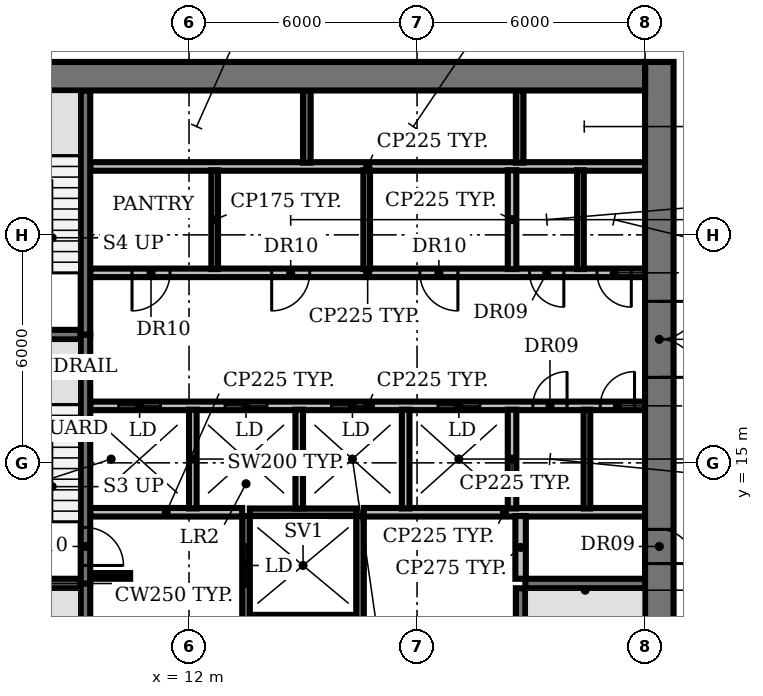
"""IFC4 building model, lengths in metres.
Left out: names, types, materials, properties, quantities, classifications, styles, units other than length and angle.
Written with IfcOpenShell. Run it as: python <this file> out.ifc"""

import sys

from ifc_helpers import new_model, si_unit, direction, frame, frame_2d, origin, place, context, subcontext, project, spatial, rectangle, extrude, element, fill, save


model = new_model("IFC4")
c1 = context("Model", 3, precision=1e-05, world=origin(), true_north=direction((0.0, 1.0)))
c2 = subcontext(c1, "Body", "Model", "MODEL_VIEW")
j1 = project(units=[si_unit("LENGTHUNIT", "METRE"), si_unit("PLANEANGLEUNIT", "RADIAN")], contexts=[c1])
p1 = place(None, origin())
s1 = spatial("IfcSite", under=j1, at=p1, CompositionType="ELEMENT")
p2 = place(p1, origin())
s2 = spatial("IfcBuilding", under=s1, at=p2, CompositionType="ELEMENT")
p3 = place(p2, frame((0.0, 0.0, 96.2)))
s3 = spatial("IfcBuildingStorey", under=s2, at=p3, CompositionType="ELEMENT", Elevation=96.2)
p4 = place(p3, frame((13.6, 10.9, 0.0), z_axis=(0.0, 0.0, 1.0), x_axis=(1.0, 0.0, 0.0)))
e1 = element("IfcWall", 1, at=p4, inside=s3, PredefinedType="SHEAR", context=c2, shape_type="SweptSolid", body=[
    extrude(rectangle(XDim=2.8, YDim=0.2, at=frame_2d((1.4, 0.0))), origin(), (0.0, 0.0, 1.0), 3.85),
])
for number, where, z_axis, x_axis in (
    (2, (6.0, 11.825, 0.0), (0.0, 0.0, 1.0), (1.0, 0.0, 0.0)),
    (3, (20.85, 11.825, 0.0), (0.0, 0.0, 1.0), (1.0, 0.0, 0.0)),
):
    element("IfcWall", number, at=place(p3, frame(where, z_axis=z_axis, x_axis=x_axis)), inside=s3, PredefinedType="SHEAR", context=c2, shape_type="SweptSolid", body=[
        extrude(rectangle(XDim=3.15, YDim=0.25, at=frame_2d((1.575, 0.0))), origin(), (0.0, 0.0, 1.0), 3.85),
    ])
p5 = place(p3, frame((9.4, 12.025, 0.0), z_axis=(0.0, 0.0, 1.0), x_axis=(1.0, 0.0, 0.0)))
e4 = element("IfcWall", 4, at=p5, inside=s3, PredefinedType="SHEAR", context=c2, shape_type="SweptSolid", body=[
    extrude(rectangle(XDim=1.05, YDim=0.15, at=frame_2d((0.525, 0.0))), origin(), (0.0, 0.0, 1.0), 3.85),
])
p6 = place(p3, frame((9.4, 13.7, 0.0), z_axis=(0.0, 0.0, 1.0), x_axis=(1.0, 0.0, 0.0)))
e5 = element("IfcWall", 5, at=p6, inside=s3, PredefinedType="PARTITIONING", context=c2, shape_type="SweptSolid", body=[
    extrude(rectangle(XDim=4.0, YDim=0.225, at=frame_2d((2.0, 0.0))), origin(), (0.0, 0.0, 1.0), 3.85),
])
p7 = place(p3, frame((13.6, 13.7, 0.0), z_axis=(0.0, 0.0, 1.0), x_axis=(1.0, 0.0, 0.0)))
e6 = element("IfcWall", 6, at=p7, inside=s3, PredefinedType="SHEAR", context=c2, shape_type="SweptSolid", body=[
    extrude(rectangle(XDim=2.8, YDim=0.2, at=frame_2d((1.4, 0.0))), origin(), (0.0, 0.0, 1.0), 3.85),
])
p8 = place(p3, frame((16.6, 13.7, 0.0), z_axis=(0.0, 0.0, 1.0), x_axis=(1.0, 0.0, 0.0)))
e7 = element("IfcWall", 7, at=p8, inside=s3, PredefinedType="PARTITIONING", context=c2, shape_type="SweptSolid", body=[
    extrude(rectangle(XDim=7.4, YDim=0.225, at=frame_2d((3.7, 0.0))), origin(), (0.0, 0.0, 1.0), 3.85),
])
p9 = place(p3, frame((9.4, 16.5, 0.0), z_axis=(0.0, 0.0, 1.0), x_axis=(1.0, 0.0, 0.0)))
e8 = element("IfcWall", 8, at=p9, inside=s3, PredefinedType="PARTITIONING", context=c2, shape_type="SweptSolid", body=[
    extrude(rectangle(XDim=14.6, YDim=0.225, at=frame_2d((7.3, 0.0))), origin(), (0.0, 0.0, 1.0), 3.85),
])
p10 = place(p9, frame((0.75, 0.0, 0.0)))
e9 = element("IfcOpeningElement", 9, at=p10, cuts=e8, PredefinedType="OPENING", context=c2, shape_type="SweptSolid", body=[
    extrude(rectangle(XDim=1.1, YDim=2.1, at=frame_2d((0.55, 1.05))), frame((0.0, 0.123, 0.0), z_axis=(0.0, -1.0, 0.0), x_axis=(1.0, 0.0, 0.0)), (0.0, 0.0, 1.0), 0.245),
])
p11 = place(p9, frame((3.55, 0.0, 0.0)))
e10 = element("IfcOpeningElement", 10, at=p11, cuts=e8, PredefinedType="OPENING", context=c2, shape_type="SweptSolid", body=[
    extrude(rectangle(XDim=1.1, YDim=2.1, at=frame_2d((0.55, 1.05))), frame((0.0, 0.123, 0.0), z_axis=(0.0, -1.0, 0.0), x_axis=(1.0, 0.0, 0.0)), (0.0, 0.0, 1.0), 0.245),
])
p12 = place(p9, frame((6.35, 0.0, 0.0)))
e11 = element("IfcOpeningElement", 11, at=p12, cuts=e8, PredefinedType="OPENING", context=c2, shape_type="SweptSolid", body=[
    extrude(rectangle(XDim=1.1, YDim=2.1, at=frame_2d((0.55, 1.05))), frame((0.0, 0.123, 0.0), z_axis=(0.0, -1.0, 0.0), x_axis=(1.0, 0.0, 0.0)), (0.0, 0.0, 1.0), 0.245),
])
p13 = place(p9, frame((9.15, 0.0, 0.0)))
e12 = element("IfcOpeningElement", 12, at=p13, cuts=e8, PredefinedType="OPENING", context=c2, shape_type="SweptSolid", body=[
    extrude(rectangle(XDim=1.1, YDim=2.1, at=frame_2d((0.55, 1.05))), frame((0.0, 0.123, 0.0), z_axis=(0.0, -1.0, 0.0), x_axis=(1.0, 0.0, 0.0)), (0.0, 0.0, 1.0), 0.245),
])
p14 = place(p9, frame((11.647, 0.0, 0.0)))
e13 = element("IfcOpeningElement", 13, at=p14, cuts=e8, PredefinedType="OPENING", context=c2, shape_type="SweptSolid", body=[
    extrude(rectangle(XDim=0.9, YDim=2.1, at=frame_2d((0.45, 1.05))), frame((0.0, 0.123, 0.0), z_axis=(0.0, -1.0, 0.0), x_axis=(1.0, 0.0, 0.0)), (0.0, 0.0, 1.0), 0.245),
])
p15 = place(p9, frame((13.423, 0.0, 0.0)))
e14 = element("IfcOpeningElement", 14, at=p15, cuts=e8, PredefinedType="OPENING", context=c2, shape_type="SweptSolid", body=[
    extrude(rectangle(XDim=0.9, YDim=2.1, at=frame_2d((0.45, 1.05))), frame((0.0, 0.123, 0.0), z_axis=(0.0, -1.0, 0.0), x_axis=(1.0, 0.0, 0.0)), (0.0, 0.0, 1.0), 0.245),
])
p16 = place(p3, frame((6.0, 18.375, 0.0), z_axis=(0.0, 0.0, 1.0), x_axis=(1.0, 0.0, 0.0)))
e15 = element("IfcWall", 15, at=p16, inside=s3, PredefinedType="SHEAR", context=c2, shape_type="SweptSolid", body=[
    extrude(rectangle(XDim=3.15, YDim=0.25, at=frame_2d((1.575, 0.0))), origin(), (0.0, 0.0, 1.0), 3.85),
])
p17 = place(p3, frame((24.0, 20.0, 0.0), z_axis=(0.0, 0.0, 1.0), x_axis=(-1.0, 0.0, 0.0)))
e16 = element("IfcWall", 16, at=p17, inside=s3, PredefinedType="PARTITIONING", context=c2, shape_type="SweptSolid", body=[
    extrude(rectangle(XDim=14.6, YDim=0.225, at=frame_2d((7.3, 0.0))), origin(), (0.0, 0.0, 1.0), 3.85),
])
p18 = place(p17, frame((12.5, 0.0, 0.0)))
e17 = element("IfcOpeningElement", 17, at=p18, cuts=e16, PredefinedType="OPENING", context=c2, shape_type="SweptSolid", body=[
    extrude(rectangle(XDim=1.0, YDim=2.1, at=frame_2d((0.5, 1.05))), frame((0.0, 0.123, 0.0), z_axis=(0.0, -1.0, 0.0), x_axis=(1.0, 0.0, 0.0)), (0.0, 0.0, 1.0), 0.245),
])
p19 = place(p17, frame((8.825, 0.0, 0.0)))
e18 = element("IfcOpeningElement", 18, at=p19, cuts=e16, PredefinedType="OPENING", context=c2, shape_type="SweptSolid", body=[
    extrude(rectangle(XDim=1.0, YDim=2.1, at=frame_2d((0.5, 1.05))), frame((0.0, 0.123, 0.0), z_axis=(0.0, -1.0, 0.0), x_axis=(1.0, 0.0, 0.0)), (0.0, 0.0, 1.0), 0.245),
])
p20 = place(p17, frame((4.925, 0.0, 0.0)))
e19 = element("IfcOpeningElement", 19, at=p20, cuts=e16, PredefinedType="OPENING", context=c2, shape_type="SweptSolid", body=[
    extrude(rectangle(XDim=1.0, YDim=2.1, at=frame_2d((0.5, 1.05))), frame((0.0, 0.123, 0.0), z_axis=(0.0, -1.0, 0.0), x_axis=(1.0, 0.0, 0.0)), (0.0, 0.0, 1.0), 0.245),
])
p21 = place(p17, frame((2.137, 0.0, 0.0)))
e20 = element("IfcOpeningElement", 20, at=p21, cuts=e16, PredefinedType="OPENING", context=c2, shape_type="SweptSolid", body=[
    extrude(rectangle(XDim=0.9, YDim=2.1, at=frame_2d((0.45, 1.05))), frame((0.0, 0.123, 0.0), z_axis=(0.0, -1.0, 0.0), x_axis=(1.0, 0.0, 0.0)), (0.0, 0.0, 1.0), 0.245),
])
p22 = place(p17, frame((0.363, 0.0, 0.0)))
e21 = element("IfcOpeningElement", 21, at=p22, cuts=e16, PredefinedType="OPENING", context=c2, shape_type="SweptSolid", body=[
    extrude(rectangle(XDim=0.9, YDim=2.1, at=frame_2d((0.45, 1.05))), frame((0.0, 0.123, 0.0), z_axis=(0.0, -1.0, 0.0), x_axis=(1.0, 0.0, 0.0)), (0.0, 0.0, 1.0), 0.245),
])
p23 = place(p3, frame((9.4, 22.8, 0.0), z_axis=(0.0, 0.0, 1.0), x_axis=(1.0, 0.0, 0.0)))
e22 = element("IfcWall", 22, at=p23, inside=s3, PredefinedType="PARTITIONING", context=c2, shape_type="SweptSolid", body=[
    extrude(rectangle(XDim=14.6, YDim=0.225, at=frame_2d((7.3, 0.0))), origin(), (0.0, 0.0, 1.0), 3.85),
])
p24 = place(p3, frame((9.275, 11.825, 0.0), z_axis=(0.0, 0.0, 1.0), x_axis=(0.0, -1.0, 0.0)))
e23 = element("IfcWall", 23, at=p24, inside=s3, PredefinedType="SHEAR", context=c2, shape_type="SweptSolid", body=[
    extrude(rectangle(XDim=6.425, YDim=0.25, at=frame_2d((3.212, 0.0))), origin(), (0.0, 0.0, 1.0), 3.85),
])
p25 = place(p24, frame((5.075, 0.0, 0.0)))
e24 = element("IfcOpeningElement", 24, at=p25, cuts=e23, PredefinedType="OPENING", context=c2, shape_type="SweptSolid", body=[
    extrude(rectangle(XDim=1.0, YDim=2.1, at=frame_2d((0.5, 1.05))), frame((0.0, 0.135, 0.0), z_axis=(0.0, -1.0, 0.0), x_axis=(1.0, 0.0, 0.0)), (0.0, 0.0, 1.0), 0.27),
])
p26 = place(p3, frame((9.275, 18.375, 0.0), z_axis=(0.0, 0.0, 1.0), x_axis=(0.0, -1.0, 0.0)))
e25 = element("IfcWall", 25, at=p26, inside=s3, PredefinedType="SHEAR", context=c2, shape_type="SweptSolid", body=[
    extrude(rectangle(XDim=6.55, YDim=0.25, at=frame_2d((3.275, 0.0))), origin(), (0.0, 0.0, 1.0), 3.85),
])
p27 = place(p26, frame((5.075, 0.0, 0.0)))
e26 = element("IfcOpeningElement", 26, at=p27, cuts=e25, PredefinedType="OPENING", context=c2, shape_type="SweptSolid", body=[
    extrude(rectangle(XDim=1.0, YDim=2.1, at=frame_2d((0.5, 1.05))), frame((0.0, 0.135, 0.0), z_axis=(0.0, -1.0, 0.0), x_axis=(1.0, 0.0, 0.0)), (0.0, 0.0, 1.0), 0.27),
])
p28 = place(p3, frame((9.275, 18.375, 0.0), z_axis=(0.0, 0.0, 1.0), x_axis=(0.0, 1.0, 0.0)))
e27 = element("IfcWall", 27, at=p28, inside=s3, PredefinedType="SHEAR", context=c2, shape_type="SweptSolid", body=[
    extrude(rectangle(XDim=6.425, YDim=0.25, at=frame_2d((3.212, 0.0))), origin(), (0.0, 0.0, 1.0), 3.85),
])
p29 = place(p3, frame((12.1, 13.8, 0.0), z_axis=(0.0, 0.0, 1.0), x_axis=(0.0, 1.0, 0.0)))
e28 = element("IfcWall", 28, at=p29, inside=s3, PredefinedType="SOLIDWALL", context=c2, shape_type="SweptSolid", body=[
    extrude(rectangle(XDim=2.6, YDim=0.2, at=frame_2d((1.3, 0.0))), origin(), (0.0, 0.0, 1.0), 3.85),
])
p30 = place(p3, frame((12.675, 20.1, 0.0), z_axis=(0.0, 0.0, 1.0), x_axis=(0.0, 1.0, 0.0)))
e29 = element("IfcWall", 29, at=p30, inside=s3, PredefinedType="PARTITIONING", context=c2, shape_type="SweptSolid", body=[
    extrude(rectangle(XDim=2.6, YDim=0.175, at=frame_2d((1.3, 0.0))), origin(), (0.0, 0.0, 1.0), 3.85),
])
p31 = place(p3, frame((13.5, 5.4, 0.0), z_axis=(0.0, 0.0, 1.0), x_axis=(0.0, 1.0, 0.0)))
e30 = element("IfcWall", 30, at=p31, inside=s3, PredefinedType="SHEAR", context=c2, shape_type="SweptSolid", body=[
    extrude(rectangle(XDim=8.2, YDim=0.2, at=frame_2d((4.1, 0.0))), origin(), (0.0, 0.0, 1.0), 3.85),
])
p32 = place(p31, frame((0.75, 0.0, 0.0)))
e31 = element("IfcOpeningElement", 31, at=p32, cuts=e30, PredefinedType="OPENING", context=c2, shape_type="SweptSolid", body=[
    extrude(rectangle(XDim=1.1, YDim=2.1, at=frame_2d((0.55, 1.05))), frame((0.0, 0.11, 0.0), z_axis=(0.0, -1.0, 0.0), x_axis=(1.0, 0.0, 0.0)), (0.0, 0.0, 1.0), 0.22),
])
p33 = place(p31, frame((3.55, 0.0, 0.0)))
e32 = element("IfcOpeningElement", 32, at=p33, cuts=e30, PredefinedType="OPENING", context=c2, shape_type="SweptSolid", body=[
    extrude(rectangle(XDim=1.1, YDim=2.1, at=frame_2d((0.55, 1.05))), frame((0.0, 0.11, 0.0), z_axis=(0.0, -1.0, 0.0), x_axis=(1.0, 0.0, 0.0)), (0.0, 0.0, 1.0), 0.22),
])
p34 = place(p31, frame((6.35, 0.0, 0.0)))
e33 = element("IfcOpeningElement", 33, at=p34, cuts=e30, PredefinedType="OPENING", context=c2, shape_type="SweptSolid", body=[
    extrude(rectangle(XDim=1.1, YDim=2.1, at=frame_2d((0.55, 1.05))), frame((0.0, 0.11, 0.0), z_axis=(0.0, -1.0, 0.0), x_axis=(1.0, 0.0, 0.0)), (0.0, 0.0, 1.0), 0.22),
])
p35 = place(p3, frame((14.9, 13.8, 0.0), z_axis=(0.0, 0.0, 1.0), x_axis=(0.0, 1.0, 0.0)))
e34 = element("IfcWall", 34, at=p35, inside=s3, PredefinedType="SOLIDWALL", context=c2, shape_type="SweptSolid", body=[
    extrude(rectangle(XDim=2.6, YDim=0.2, at=frame_2d((1.3, 0.0))), origin(), (0.0, 0.0, 1.0), 3.85),
])
p36 = place(p3, frame((15.1, 22.9, 0.0), z_axis=(0.0, 0.0, 1.0), x_axis=(0.0, 1.0, 0.0)))
e35 = element("IfcWall", 35, at=p36, inside=s3, PredefinedType="SHEAR", context=c2, shape_type="SweptSolid", body=[
    extrude(rectangle(XDim=1.9, YDim=0.2, at=frame_2d((0.95, 0.0))), origin(), (0.0, 0.0, 1.0), 3.85),
])
p37 = place(p3, frame((16.5, 5.4, 0.0), z_axis=(0.0, 0.0, 1.0), x_axis=(0.0, 1.0, 0.0)))
e36 = element("IfcWall", 36, at=p37, inside=s3, PredefinedType="SHEAR", context=c2, shape_type="SweptSolid", body=[
    extrude(rectangle(XDim=8.2, YDim=0.2, at=frame_2d((4.1, 0.0))), origin(), (0.0, 0.0, 1.0), 3.85),
])
p38 = place(p3, frame((16.675, 20.1, 0.0), z_axis=(0.0, 0.0, 1.0), x_axis=(0.0, 1.0, 0.0)))
e37 = element("IfcWall", 37, at=p38, inside=s3, PredefinedType="PARTITIONING", context=c2, shape_type="SweptSolid", body=[
    extrude(rectangle(XDim=2.6, YDim=0.175, at=frame_2d((1.3, 0.0))), origin(), (0.0, 0.0, 1.0), 3.85),
])
p39 = place(p3, frame((17.7, 13.8, 0.0), z_axis=(0.0, 0.0, 1.0), x_axis=(0.0, 1.0, 0.0)))
e38 = element("IfcWall", 38, at=p39, inside=s3, PredefinedType="SOLIDWALL", context=c2, shape_type="SweptSolid", body=[
    extrude(rectangle(XDim=2.6, YDim=0.2, at=frame_2d((1.3, 0.0))), origin(), (0.0, 0.0, 1.0), 3.85),
])
for number, where, z_axis, x_axis in (
    (39, (20.5, 13.8, 0.0), (0.0, 0.0, 1.0), (0.0, 1.0, 0.0)),
    (40, (20.5, 20.1, 0.0), (0.0, 0.0, 1.0), (0.0, 1.0, 0.0)),
):
    element("IfcWall", number, at=place(p3, frame(where, z_axis=z_axis, x_axis=x_axis)), inside=s3, PredefinedType="PARTITIONING", context=c2, shape_type="SweptSolid", body=[
        extrude(rectangle(XDim=2.6, YDim=0.225, at=frame_2d((1.3, 0.0))), origin(), (0.0, 0.0, 1.0), 3.85),
    ])
p40 = place(p3, frame((20.7, 22.9, 0.0), z_axis=(0.0, 0.0, 1.0), x_axis=(0.0, 1.0, 0.0)))
e41 = element("IfcWall", 41, at=p40, inside=s3, PredefinedType="SHEAR", context=c2, shape_type="SweptSolid", body=[
    extrude(rectangle(XDim=1.9, YDim=0.2, at=frame_2d((0.95, 0.0))), origin(), (0.0, 0.0, 1.0), 3.85),
])
p41 = place(p3, frame((20.725, 5.4, 0.0), z_axis=(0.0, 0.0, 1.0), x_axis=(0.0, 1.0, 0.0)))
e42 = element("IfcWall", 42, at=p41, inside=s3, PredefinedType="SHEAR", context=c2, shape_type="SweptSolid", body=[
    extrude(rectangle(XDim=6.3, YDim=0.25, at=frame_2d((3.15, 0.0))), origin(), (0.0, 0.0, 1.0), 3.85),
])
p42 = place(p3, frame((20.725, 11.95, 0.0), z_axis=(0.0, 0.0, 1.0), x_axis=(0.0, 1.0, 0.0)))
e43 = element("IfcWall", 43, at=p42, inside=s3, PredefinedType="PARTITIONING", context=c2, shape_type="SweptSolid", body=[
    extrude(rectangle(XDim=1.65, YDim=0.275, at=frame_2d((0.825, 0.0))), origin(), (0.0, 0.0, 1.0), 3.85),
])
for number, where, z_axis, x_axis in (
    (44, (22.3, 20.1, 0.0), (0.0, 0.0, 1.0), (0.0, 1.0, 0.0)),
    (45, (22.47, 13.8, 0.0), (0.0, 0.0, 1.0), (0.0, 1.0, 0.0)),
):
    element("IfcWall", number, at=place(p3, frame(where, z_axis=z_axis, x_axis=x_axis)), inside=s3, PredefinedType="PARTITIONING", context=c2, shape_type="SweptSolid", body=[
        extrude(rectangle(XDim=2.6, YDim=0.175, at=frame_2d((1.3, 0.0))), origin(), (0.0, 0.0, 1.0), 3.85),
    ])
p43 = place(p3, frame((24.375, 25.55, 0.0), z_axis=(0.0, 0.0, 1.0), x_axis=(0.0, -1.0, 0.0)))
e46 = element("IfcWall", 46, at=p43, inside=s3, PredefinedType="SHEAR", context=c2, shape_type="SweptSolid", body=[
    extrude(rectangle(XDim=21.13, YDim=0.75, at=frame_2d((10.565, 0.0))), origin(), (0.0, 0.0, 1.0), 3.85),
])
p44 = place(p43, frame((18.4, 0.0, 0.0)))
e47 = element("IfcOpeningElement", 47, at=p44, cuts=e46, PredefinedType="OPENING", context=c2, shape_type="SweptSolid", body=[
    extrude(rectangle(XDim=1.5, YDim=2.1, at=frame_2d((0.75, 1.05))), frame((0.0, 0.385, 0.0), z_axis=(0.0, -1.0, 0.0), x_axis=(1.0, 0.0, 0.0)), (0.0, 0.0, 1.0), 0.77),
])
p45 = place(p43, frame((12.3, 0.0, 0.0)))
e48 = element("IfcOpeningElement", 48, at=p45, cuts=e46, PredefinedType="OPENING", context=c2, shape_type="SweptSolid", body=[
    extrude(rectangle(XDim=0.9, YDim=2.1, at=frame_2d((0.45, 1.05))), frame((0.0, 0.385, 0.0), z_axis=(0.0, -1.0, 0.0), x_axis=(1.0, 0.0, 0.0)), (0.0, 0.0, 1.0), 0.77),
])
p46 = place(p43, frame((6.3, 0.0, 0.0)))
e49 = element("IfcOpeningElement", 49, at=p46, cuts=e46, PredefinedType="OPENING", context=c2, shape_type="SweptSolid", body=[
    extrude(rectangle(XDim=2.0, YDim=2.1, at=frame_2d((1.0, 1.05))), frame((0.0, 0.385, 0.0), z_axis=(0.0, -1.0, 0.0), x_axis=(1.0, 0.0, 0.0)), (0.0, 0.0, 1.0), 0.77),
])
p47 = place(p3, frame((6.0, 25.175, 0.0), z_axis=(0.0, 0.0, 1.0), x_axis=(1.0, 0.0, 0.0)))
e50 = element("IfcWall", 50, at=p47, inside=s3, PredefinedType="SHEAR", context=c2, shape_type="SweptSolid", body=[
    extrude(rectangle(XDim=18.0, YDim=0.75, at=frame_2d((9.0, 0.0))), origin(), (0.0, 0.0, 1.0), 3.85),
])
p48 = place(p10, origin())
e51 = element("IfcDoor", 51, at=p48, inside=s3, OperationType="DOUBLE_DOOR_SLIDING", PredefinedType="DOOR", context=c2, shape_type="SweptSolid", body=[
    extrude(rectangle(XDim=1.1, YDim=2.1, at=frame_2d((0.55, 1.05))), frame((0.0, 0.025, 0.0), z_axis=(0.0, -1.0, 0.0), x_axis=(1.0, 0.0, 0.0)), (0.0, 0.0, 1.0), 0.05),
])
fill(e9, e51)
p49 = place(p11, origin())
e52 = element("IfcDoor", 52, at=p49, inside=s3, OperationType="DOUBLE_DOOR_SLIDING", PredefinedType="DOOR", context=c2, shape_type="SweptSolid", body=[
    extrude(rectangle(XDim=1.1, YDim=2.1, at=frame_2d((0.55, 1.05))), frame((0.0, 0.025, 0.0), z_axis=(0.0, -1.0, 0.0), x_axis=(1.0, 0.0, 0.0)), (0.0, 0.0, 1.0), 0.05),
])
fill(e10, e52)
p50 = place(p12, origin())
e53 = element("IfcDoor", 53, at=p50, inside=s3, OperationType="DOUBLE_DOOR_SLIDING", PredefinedType="DOOR", context=c2, shape_type="SweptSolid", body=[
    extrude(rectangle(XDim=1.1, YDim=2.1, at=frame_2d((0.55, 1.05))), frame((0.0, 0.025, 0.0), z_axis=(0.0, -1.0, 0.0), x_axis=(1.0, 0.0, 0.0)), (0.0, 0.0, 1.0), 0.05),
])
fill(e11, e53)
p51 = place(p13, origin())
e54 = element("IfcDoor", 54, at=p51, inside=s3, OperationType="DOUBLE_DOOR_SLIDING", PredefinedType="DOOR", context=c2, shape_type="SweptSolid", body=[
    extrude(rectangle(XDim=1.1, YDim=2.1, at=frame_2d((0.55, 1.05))), frame((0.0, 0.025, 0.0), z_axis=(0.0, -1.0, 0.0), x_axis=(1.0, 0.0, 0.0)), (0.0, 0.0, 1.0), 0.05),
])
fill(e12, e54)
p52 = place(p14, origin())
e55 = element("IfcDoor", 55, at=p52, inside=s3, OperationType="SINGLE_SWING_RIGHT", PredefinedType="DOOR", context=c2, shape_type="SweptSolid", body=[
    extrude(rectangle(XDim=0.9, YDim=2.1, at=frame_2d((0.45, 1.05))), frame((0.0, 0.025, 0.0), z_axis=(0.0, -1.0, 0.0), x_axis=(1.0, 0.0, 0.0)), (0.0, 0.0, 1.0), 0.05),
])
fill(e13, e55)
p53 = place(p15, origin())
e56 = element("IfcDoor", 56, at=p53, inside=s3, OperationType="SINGLE_SWING_RIGHT", PredefinedType="DOOR", context=c2, shape_type="SweptSolid", body=[
    extrude(rectangle(XDim=0.9, YDim=2.1, at=frame_2d((0.45, 1.05))), frame((0.0, 0.025, 0.0), z_axis=(0.0, -1.0, 0.0), x_axis=(1.0, 0.0, 0.0)), (0.0, 0.0, 1.0), 0.05),
])
fill(e14, e56)
p54 = place(p18, origin())
e57 = element("IfcDoor", 57, at=p54, inside=s3, OperationType="SINGLE_SWING_RIGHT", PredefinedType="DOOR", context=c2, shape_type="SweptSolid", body=[
    extrude(rectangle(XDim=1.0, YDim=2.1, at=frame_2d((0.5, 1.05))), frame((0.0, 0.025, 0.0), z_axis=(0.0, -1.0, 0.0), x_axis=(1.0, 0.0, 0.0)), (0.0, 0.0, 1.0), 0.05),
])
fill(e17, e57)
p55 = place(p19, origin())
e58 = element("IfcDoor", 58, at=p55, inside=s3, OperationType="SINGLE_SWING_RIGHT", PredefinedType="DOOR", context=c2, shape_type="SweptSolid", body=[
    extrude(rectangle(XDim=1.0, YDim=2.1, at=frame_2d((0.5, 1.05))), frame((0.0, 0.025, 0.0), z_axis=(0.0, -1.0, 0.0), x_axis=(1.0, 0.0, 0.0)), (0.0, 0.0, 1.0), 0.05),
])
fill(e18, e58)
p56 = place(p20, origin())
e59 = element("IfcDoor", 59, at=p56, inside=s3, OperationType="SINGLE_SWING_LEFT", PredefinedType="DOOR", context=c2, shape_type="SweptSolid", body=[
    extrude(rectangle(XDim=1.0, YDim=2.1, at=frame_2d((0.5, 1.05))), frame((0.0, 0.025, 0.0), z_axis=(0.0, -1.0, 0.0), x_axis=(1.0, 0.0, 0.0)), (0.0, 0.0, 1.0), 0.05),
])
fill(e19, e59)
p57 = place(p21, origin())
e60 = element("IfcDoor", 60, at=p57, inside=s3, OperationType="SINGLE_SWING_LEFT", PredefinedType="DOOR", context=c2, shape_type="SweptSolid", body=[
    extrude(rectangle(XDim=0.9, YDim=2.1, at=frame_2d((0.45, 1.05))), frame((0.0, 0.025, 0.0), z_axis=(0.0, -1.0, 0.0), x_axis=(1.0, 0.0, 0.0)), (0.0, 0.0, 1.0), 0.05),
])
fill(e20, e60)
p58 = place(p22, origin())
e61 = element("IfcDoor", 61, at=p58, inside=s3, OperationType="SINGLE_SWING_LEFT", PredefinedType="DOOR", context=c2, shape_type="SweptSolid", body=[
    extrude(rectangle(XDim=0.9, YDim=2.1, at=frame_2d((0.45, 1.05))), frame((0.0, 0.025, 0.0), z_axis=(0.0, -1.0, 0.0), x_axis=(1.0, 0.0, 0.0)), (0.0, 0.0, 1.0), 0.05),
])
fill(e21, e61)
p59 = place(p27, origin())
e62 = element("IfcDoor", 62, at=p59, inside=s3, OperationType="SINGLE_SWING_RIGHT", PredefinedType="DOOR", context=c2, shape_type="SweptSolid", body=[
    extrude(rectangle(XDim=1.0, YDim=2.1, at=frame_2d((0.5, 1.05))), frame((0.0, 0.025, 0.0), z_axis=(0.0, -1.0, 0.0), x_axis=(1.0, 0.0, 0.0)), (0.0, 0.0, 1.0), 0.05),
])
fill(e26, e62)
p60 = place(p34, origin())
e63 = element("IfcDoor", 63, at=p60, inside=s3, OperationType="DOUBLE_DOOR_SLIDING", PredefinedType="DOOR", context=c2, shape_type="SweptSolid", body=[
    extrude(rectangle(XDim=1.1, YDim=2.1, at=frame_2d((0.55, 1.05))), frame((0.0, 0.025, 0.0), z_axis=(0.0, -1.0, 0.0), x_axis=(1.0, 0.0, 0.0)), (0.0, 0.0, 1.0), 0.05),
])
fill(e33, e63)
p61 = place(p45, origin())
e64 = element("IfcDoor", 64, at=p61, inside=s3, OperationType="SINGLE_SWING_RIGHT", PredefinedType="DOOR", context=c2, shape_type="SweptSolid", body=[
    extrude(rectangle(XDim=0.9, YDim=2.1, at=frame_2d((0.45, 1.05))), frame((0.0, -0.315, 0.0), z_axis=(0.0, -1.0, 0.0), x_axis=(1.0, 0.0, 0.0)), (0.0, 0.0, 1.0), 0.05),
])
fill(e48, e64)
p62 = place(p46, origin())
e65 = element("IfcDoor", 65, at=p62, inside=s3, OperationType="DOUBLE_DOOR_SINGLE_SWING", PredefinedType="DOOR", context=c2, shape_type="SweptSolid", body=[
    extrude(rectangle(XDim=2.0, YDim=2.1, at=frame_2d((1.0, 1.05))), frame((0.0, 0.025, 0.0), z_axis=(0.0, -1.0, 0.0), x_axis=(1.0, 0.0, 0.0)), (0.0, 0.0, 1.0), 0.05),
])
fill(e49, e65)
save(model, sys.argv[1])
